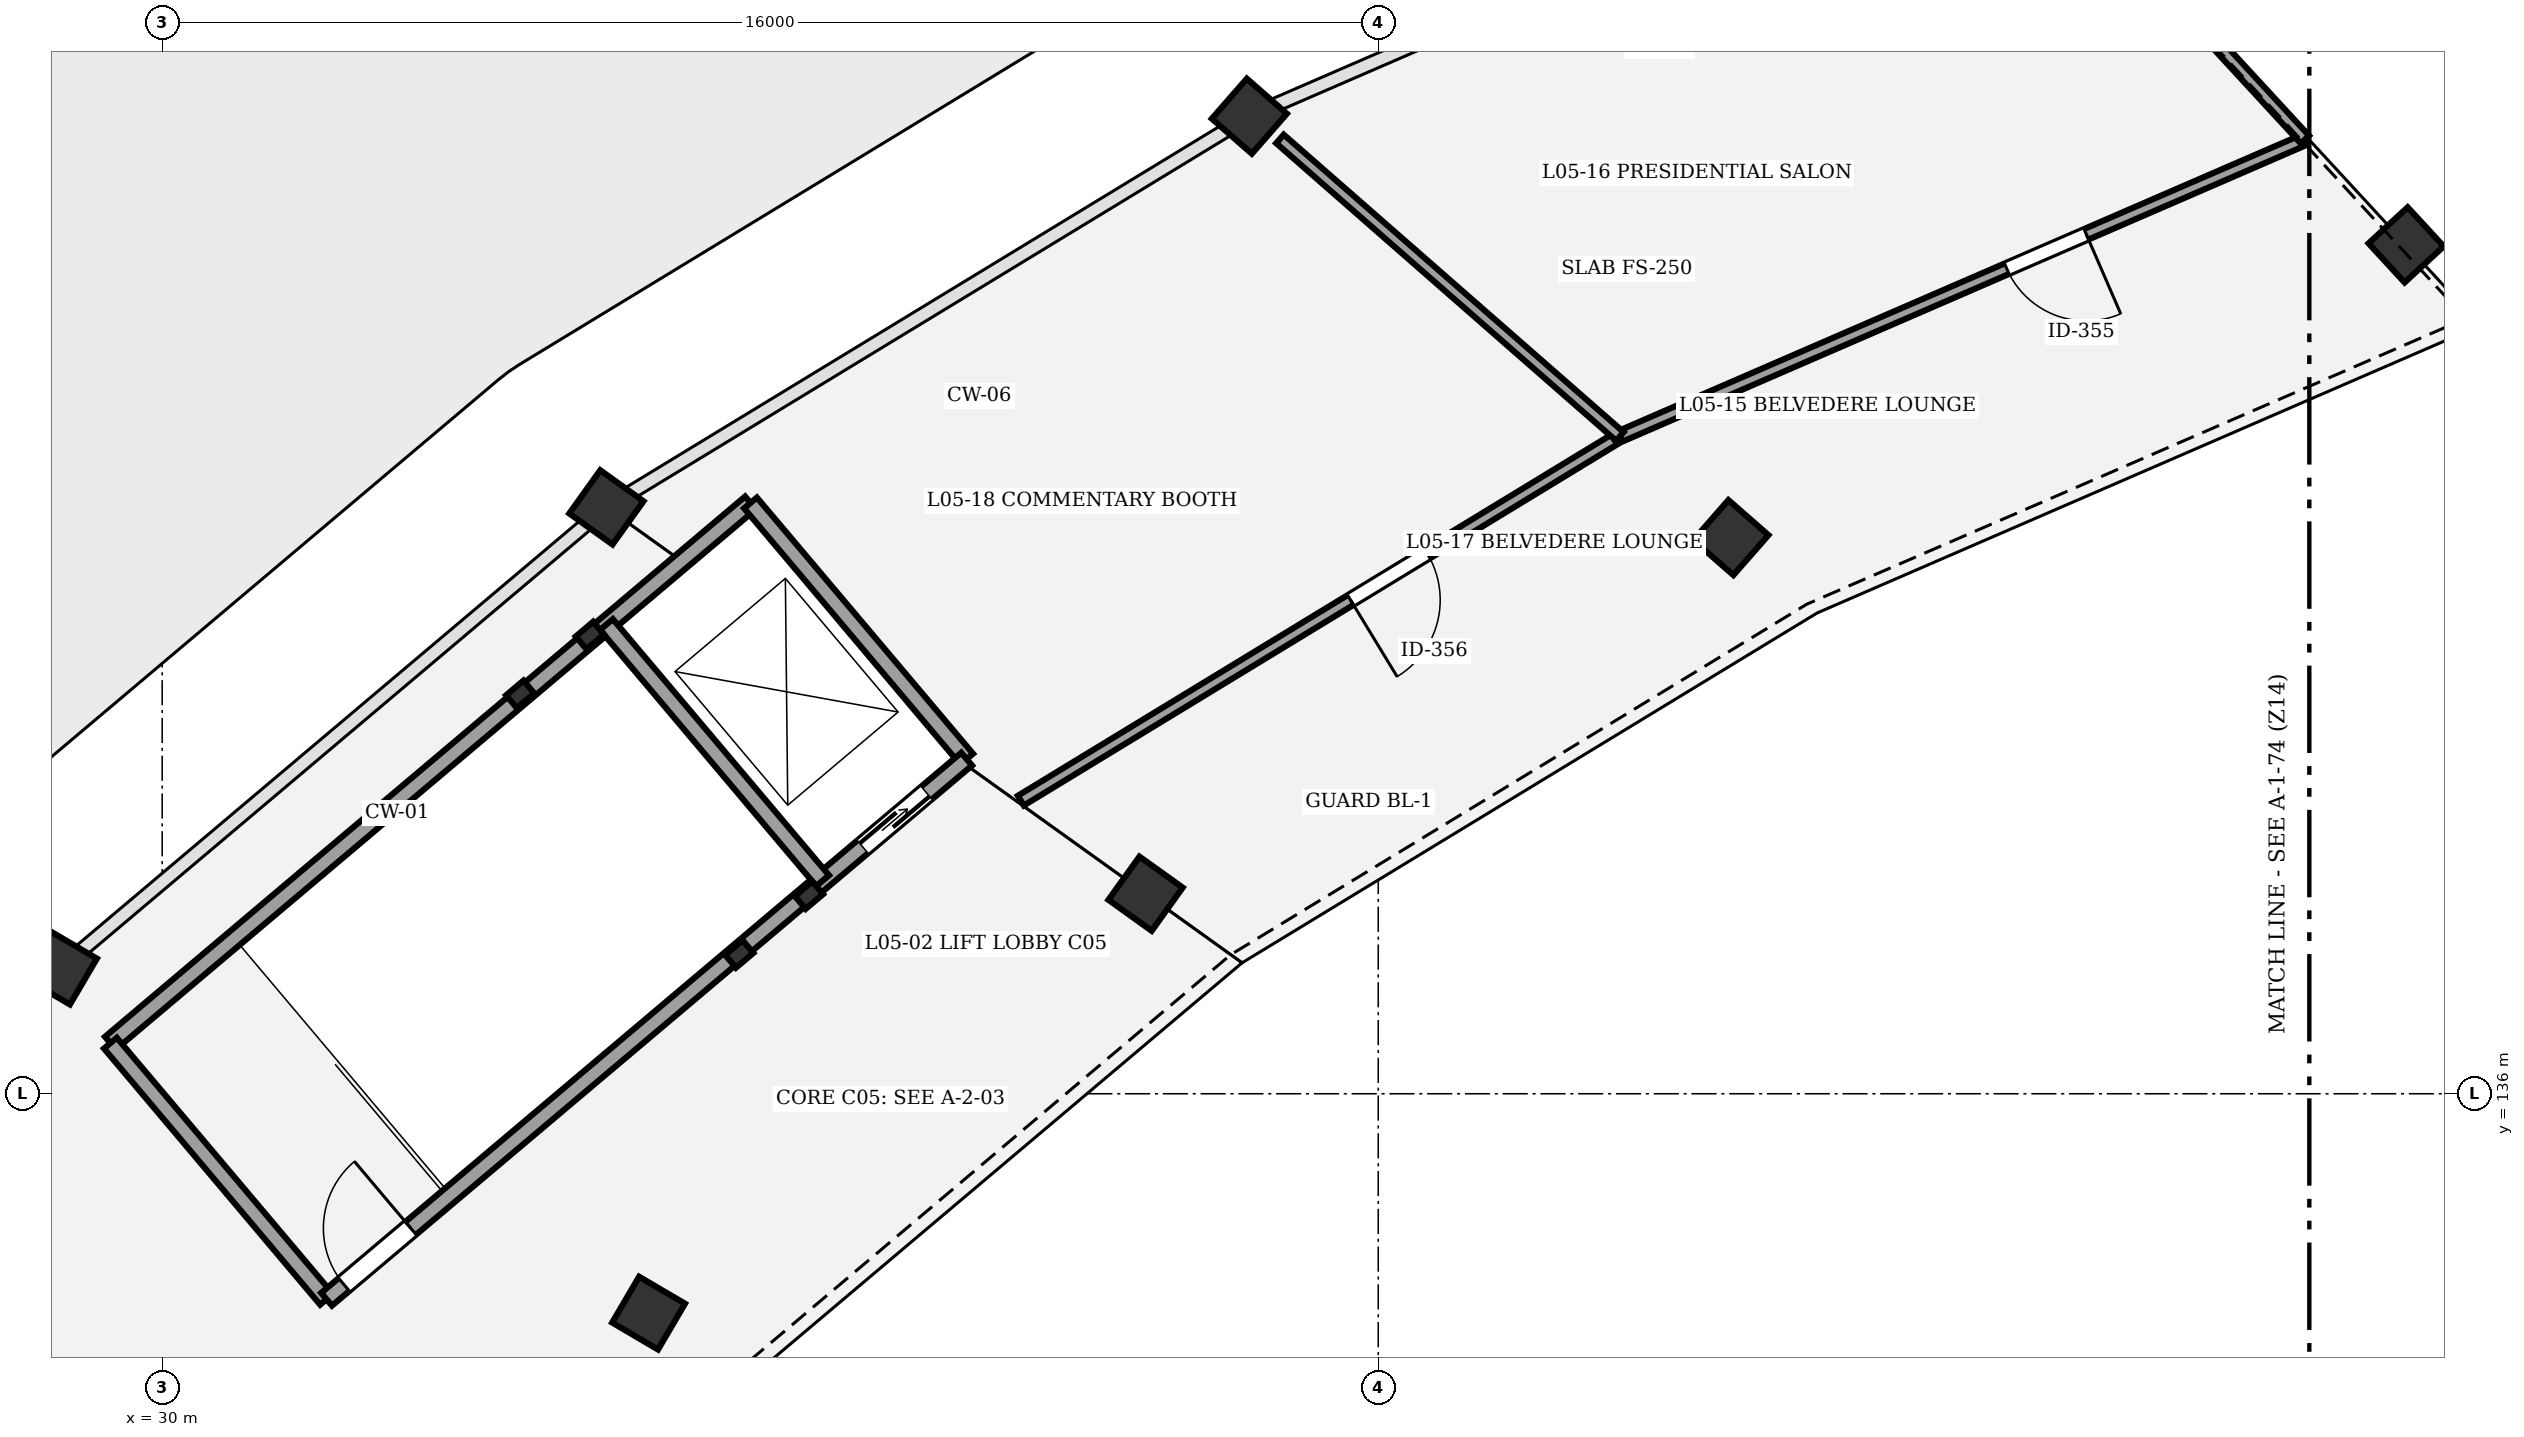
"""IFC4 building model, lengths in metres.
Left out: names, types, materials, properties, quantities, classifications, styles, units other than length and angle.
Written with IfcOpenShell. Run it as: python <this file> out.ifc"""

import sys

from ifc_helpers import new_model, si_unit, direction, frame, frame_2d, origin, origin_2d, place, context, subcontext, project, spatial, rectangle, extrude, element, fill, save


model = new_model("IFC4")
c1 = context("Model", 3, precision=1e-05, world=origin(), true_north=direction((0.0, 1.0)))
c2 = subcontext(c1, "Body", "Model", "MODEL_VIEW")
j1 = project(units=[si_unit("LENGTHUNIT", "METRE"), si_unit("PLANEANGLEUNIT", "RADIAN")], contexts=[c1])
p1 = place(None, origin())
s1 = spatial("IfcSite", under=j1, at=p1, CompositionType="ELEMENT")
p2 = place(p1, origin())
s2 = spatial("IfcBuilding", under=s1, at=p2, CompositionType="ELEMENT")
p3 = place(p2, frame((0.0, 0.0, 24.0)))
s3 = spatial("IfcBuildingStorey", under=s2, at=p3, CompositionType="ELEMENT", Elevation=24.0)
for number, where, z_axis, x_axis in (
    (1, (59.524, 147.168, 0.0), (0.0, 0.0, 1.0), (-0.678, 0.735, 0.0)),
    (2, (50.64, 143.317, 0.0), (0.0, 0.0, 1.0), (-0.753, 0.659, 0.0)),
    (3, (44.304, 148.861, 0.0), (0.0, 0.0, 1.0), (-0.753, 0.659, 0.0)),
    (4, (42.939, 138.632, 0.0), (0.0, 0.0, 1.0), (-0.813, 0.582, 0.0)),
    (5, (35.844, 143.715, 0.0), (0.0, 0.0, 1.0), (-0.813, 0.582, 0.0)),
    (6, (36.4, 133.114, 0.0), (0.0, 0.0, 1.0), (-0.863, 0.506, 0.0)),
    (7, (28.662, 137.654, 0.0), (0.0, 0.0, 1.0), (-0.863, 0.506, 0.0)),
):
    element("IfcColumn", number, at=place(p3, frame(where, z_axis=z_axis, x_axis=x_axis)), inside=s3, PredefinedType="COLUMN", context=c2, shape_type="SweptSolid", body=[
        extrude(rectangle(XDim=0.7, YDim=0.7, at=origin_2d()), origin(), (0.0, 0.0, 1.0), 4.8),
    ])
for number, where, z_axis, x_axis in (
    (8, (37.593, 137.839, 0.0), (0.0, 0.0, 1.0), (0.764, 0.645, 0.0)),
    (9, (38.51, 138.613, 0.0), (0.0, 0.0, 1.0), (0.764, 0.645, 0.0)),
    (10, (35.627, 142.029, 0.0), (0.0, 0.0, 1.0), (0.764, 0.645, 0.0)),
    (11, (34.71, 141.255, 0.0), (0.0, 0.0, 1.0), (0.764, 0.645, 0.0)),
):
    element("IfcColumn", number, at=place(p3, frame(where, z_axis=z_axis, x_axis=x_axis)), inside=s3, PredefinedType="COLUMN", context=c2, shape_type="SweptSolid", body=[
        extrude(rectangle(XDim=0.3, YDim=0.22, at=origin_2d()), origin(), (0.0, 0.0, 1.0), 4.8),
    ])
p4 = place(p3, frame((29.319, 136.666, 0.0), z_axis=(0.0, 0.0, 1.0), x_axis=(0.764247804305, 0.644922703598, 0.0)))
e12 = element("IfcWall", 12, at=p4, inside=s3, PredefinedType="SHEAR", context=c2, shape_type="SweptSolid", body=[
    extrude(rectangle(XDim=11.02, YDim=0.22, at=frame_2d((5.51, 0.0))), origin(), (0.0, 0.0, 1.0), 4.55),
])
p5 = place(p3, frame((32.163, 133.296, 0.0), z_axis=(0.0, 0.0, 1.0), x_axis=(-0.644904288042, 0.764263344185, 0.0)))
e13 = element("IfcWall", 13, at=p5, inside=s3, PredefinedType="SHEAR", context=c2, shape_type="SweptSolid", body=[
    extrude(rectangle(XDim=4.41, YDim=0.22, at=frame_2d((2.205, 0.0))), origin(), (0.0, 0.0, 1.0), 4.55),
])
p6 = place(p3, frame((40.585, 140.403, 0.0), z_axis=(0.0, 0.0, 1.0), x_axis=(-0.644936622785, 0.764236058159, 0.0)))
e14 = element("IfcWall", 14, at=p6, inside=s3, PredefinedType="SHEAR", context=c2, shape_type="SweptSolid", body=[
    extrude(rectangle(XDim=4.41, YDim=0.22, at=frame_2d((2.205, 0.0))), origin(), (0.0, 0.0, 1.0), 4.55),
])
p7 = place(p3, frame((32.163, 133.296, 0.0), z_axis=(0.0, 0.0, 1.0), x_axis=(0.764257018762, 0.644911784102, 0.0)))
e15 = element("IfcWall", 15, at=p7, inside=s3, PredefinedType="SHEAR", context=c2, shape_type="SweptSolid", body=[
    extrude(rectangle(XDim=11.02, YDim=0.22, at=frame_2d((5.51, 0.0))), origin(), (0.0, 0.0, 1.0), 4.55),
])
p8 = place(p7, frame((0.3, 0.0, 0.0)))
e16 = element("IfcOpeningElement", 16, at=p8, cuts=e15, PredefinedType="OPENING", context=c2, shape_type="SweptSolid", body=[
    extrude(rectangle(XDim=1.15, YDim=2.15, at=frame_2d((0.575, 1.075))), frame((0.0, 0.12, 0.0), z_axis=(0.0, -1.0, 0.0), x_axis=(1.0, 0.0, 0.0)), (0.0, 0.0, 1.0), 0.24),
])
p9 = place(p7, frame((9.23, 0.0, 0.0)))
e17 = element("IfcOpeningElement", 17, at=p9, cuts=e15, PredefinedType="OPENING", context=c2, shape_type="SweptSolid", body=[
    extrude(rectangle(XDim=1.1, YDim=2.15, at=frame_2d((0.55, 1.075))), frame((0.0, 0.12, 0.0), z_axis=(0.0, -1.0, 0.0), x_axis=(1.0, 0.0, 0.0)), (0.0, 0.0, 1.0), 0.24),
])
p10 = place(p3, frame((38.689, 138.803, 0.0), z_axis=(0.0, 0.0, 1.0), x_axis=(-0.644904288042, 0.764263344185, 0.0)))
e18 = element("IfcWall", 18, at=p10, inside=s3, PredefinedType="SHEAR", context=c2, shape_type="SweptSolid", body=[
    extrude(rectangle(XDim=4.41, YDim=0.22, at=frame_2d((2.205, 0.0))), origin(), (0.0, 0.0, 1.0), 4.55),
])
p11 = place(p3, frame((58.191, 148.554, 0.0), z_axis=(0.0, 0.0, 1.0), x_axis=(-0.917503021027, -0.397728810128, 0.0)))
e19 = element("IfcWall", 19, at=p11, inside=s3, PredefinedType="PARTITIONING", context=c2, shape_type="SweptSolid", body=[
    extrude(rectangle(XDim=9.822, YDim=0.15, at=frame_2d((4.911, 0.0))), origin(), (0.0, 0.0, 1.0), 3.55),
])
p12 = place(p11, frame((3.135, 0.0, 0.0)))
e20 = element("IfcOpeningElement", 20, at=p12, cuts=e19, PredefinedType="OPENING", context=c2, shape_type="SweptSolid", body=[
    extrude(rectangle(XDim=1.14, YDim=2.3, at=frame_2d((0.57, 1.15))), frame((0.0, 0.085, 0.0), z_axis=(0.0, -1.0, 0.0), x_axis=(1.0, 0.0, 0.0)), (0.0, 0.0, 1.0), 0.17),
])
p13 = place(p3, frame((49.105, 144.606, 0.0), z_axis=(0.0, 0.0, 1.0), x_axis=(-0.854322857841, -0.519742681113, 0.0)))
e21 = element("IfcWall", 21, at=p13, inside=s3, PredefinedType="PARTITIONING", context=c2, shape_type="SweptSolid", body=[
    extrude(rectangle(XDim=9.139, YDim=0.15, at=frame_2d((4.569, 0.0))), origin(), (0.0, 0.0, 1.0), 3.55),
])
p14 = place(p13, frame((2.882, 0.0, 0.0)))
e22 = element("IfcOpeningElement", 22, at=p14, cuts=e21, PredefinedType="OPENING", context=c2, shape_type="SweptSolid", body=[
    extrude(rectangle(XDim=1.18, YDim=2.3, at=frame_2d((0.59, 1.15))), frame((0.0, 0.085, 0.0), z_axis=(0.0, -1.0, 0.0), x_axis=(1.0, 0.0, 0.0)), (0.0, 0.0, 1.0), 0.17),
])
p15 = place(p3, frame((54.372, 152.697, 0.0), z_axis=(0.0, 0.0, 1.0), x_axis=(0.677864295951, -0.735187048495, 0.0)))
e23 = element("IfcWall", 23, at=p15, inside=s3, PredefinedType="PARTITIONING", context=c2, shape_type="SweptSolid", body=[
    extrude(rectangle(XDim=5.635, YDim=0.15, at=frame_2d((2.817, 0.0))), origin(), (0.0, 0.0, 1.0), 3.55),
])
p16 = place(p3, frame((49.18, 144.647, 0.0), z_axis=(0.0, 0.0, 1.0), x_axis=(-0.752569061738, 0.65851333116, 0.0)))
e24 = element("IfcWall", 24, at=p16, inside=s3, PredefinedType="PARTITIONING", context=c2, shape_type="SweptSolid", body=[
    extrude(rectangle(XDim=5.944, YDim=0.15, at=frame_2d((2.972, 0.0))), origin(), (0.0, 0.0, 1.0), 3.55),
])
p17 = place(p8, origin())
e25 = element("IfcDoor", 25, at=p17, inside=s3, OperationType="SINGLE_SWING_RIGHT", PredefinedType="DOOR", context=c2, shape_type="SweptSolid", body=[
    extrude(rectangle(XDim=1.15, YDim=2.15, at=frame_2d((0.575, 1.075))), frame((0.0, 0.025, 0.0), z_axis=(0.0, -1.0, 0.0), x_axis=(1.0, 0.0, 0.0)), (0.0, 0.0, 1.0), 0.05),
])
fill(e16, e25)
p18 = place(p9, origin())
e26 = element("IfcDoor", 26, at=p18, inside=s3, OperationType="DOUBLE_DOOR_SLIDING", PredefinedType="DOOR", context=c2, shape_type="SweptSolid", body=[
    extrude(rectangle(XDim=1.1, YDim=2.15, at=frame_2d((0.55, 1.075))), frame((0.0, 0.025, 0.0), z_axis=(0.0, -1.0, 0.0), x_axis=(1.0, 0.0, 0.0)), (0.0, 0.0, 1.0), 0.05),
])
fill(e17, e26)
p19 = place(p12, origin())
e27 = element("IfcDoor", 27, at=p19, inside=s3, OperationType="SINGLE_SWING_LEFT", PredefinedType="DOOR", context=c2, shape_type="SweptSolid", body=[
    extrude(rectangle(XDim=1.14, YDim=2.3, at=frame_2d((0.57, 1.15))), frame((0.0, 0.025, 0.0), z_axis=(0.0, -1.0, 0.0), x_axis=(1.0, 0.0, 0.0)), (0.0, 0.0, 1.0), 0.05),
])
fill(e20, e27)
p20 = place(p14, origin())
e28 = element("IfcDoor", 28, at=p20, inside=s3, OperationType="SINGLE_SWING_RIGHT", PredefinedType="DOOR", context=c2, shape_type="SweptSolid", body=[
    extrude(rectangle(XDim=1.18, YDim=2.3, at=frame_2d((0.59, 1.15))), frame((0.0, 0.025, 0.0), z_axis=(0.0, -1.0, 0.0), x_axis=(1.0, 0.0, 0.0)), (0.0, 0.0, 1.0), 0.05),
])
fill(e22, e28)
save(model, sys.argv[1])
